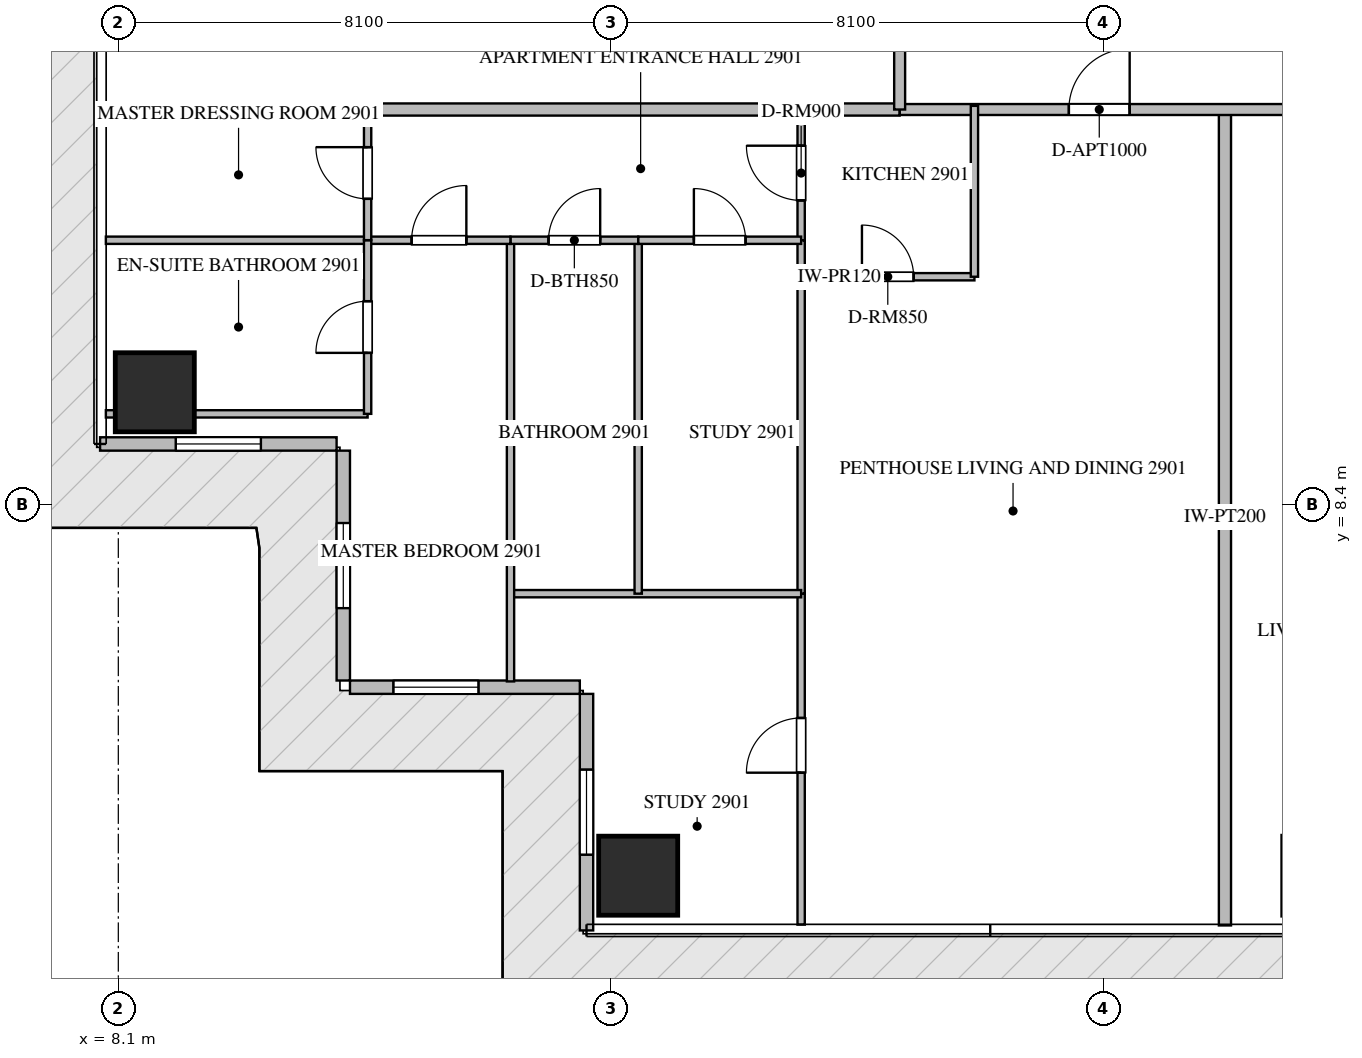
"""IFC4 building model, lengths in metres.
Left out: names, types, materials, properties, quantities, classifications, styles, units other than length and angle.
Written with IfcOpenShell. Run it as: python <this file> out.ifc"""

import sys

from ifc_helpers import new_model, si_unit, direction, frame, frame_2d, origin, origin_2d, place, context, subcontext, project, spatial, rectangle, extrude, source, transform, mapped, element, fill, save


model = new_model("IFC4")
c1 = context("Model", 3, precision=1e-05, world=origin(), true_north=direction((0.0, 1.0)))
c2 = subcontext(c1, "Body", "Model", "MODEL_VIEW")
j1 = project(units=[si_unit("LENGTHUNIT", "METRE"), si_unit("PLANEANGLEUNIT", "RADIAN")], contexts=[c1])
p1 = place(None, origin())
s1 = spatial("IfcSite", under=j1, at=p1, CompositionType="ELEMENT")
p2 = place(p1, origin())
s2 = spatial("IfcBuilding", under=s1, at=p2, CompositionType="ELEMENT")
p3 = place(p2, frame((0.0, 0.0, 120.15)))
s3 = spatial("IfcBuildingStorey", under=s2, at=p3, CompositionType="ELEMENT", Elevation=120.15)
m1 = source(origin(), c2, "Body", "SweptSolid", [
    extrude(rectangle(XDim=1.3, YDim=1.3, at=origin_2d()), origin(), (0.0, 0.0, 1.0), 3.93),
])
for number, where, z_axis, x_axis in (
    (1, (16.65, 2.3, -0.44), (0.0, 0.0, 1.0), (1.0, 0.0, 0.0)),
    (2, (8.7, 10.25, -0.44), (0.0, 0.0, 1.0), (1.0, 0.0, 0.0)),
):
    element("IfcColumn", number, at=place(p3, frame(where, z_axis=z_axis, x_axis=x_axis)), inside=s3, PredefinedType="COLUMN", context=c2, shape_type="MappedRepresentation", body=[
        mapped(m1, transform((0.0, 0.0, 0.0), scale=1.0)),
    ])
p4 = place(p3, frame((7.8, 9.4, 0.0), z_axis=(0.0, 0.0, 1.0), x_axis=(1.0, 0.0, 0.0)))
e3 = element("IfcWall", 3, at=p4, inside=s3, PredefinedType="ELEMENTEDWALL", context=c2, shape_type="SweptSolid", body=[
    extrude(rectangle(XDim=3.89, YDim=0.22, at=frame_2d((1.945, 0.0))), origin(), (0.0, 0.0, 1.0), 3.475),
])
p5 = place(p4, frame((1.245, 0.0, 0.65)))
e4 = element("IfcOpeningElement", 4, at=p5, cuts=e3, PredefinedType="OPENING", context=c2, shape_type="SweptSolid", body=[
    extrude(rectangle(XDim=1.4, YDim=2.05, at=frame_2d((0.7, 1.025))), frame((0.0, 0.12, 0.0), z_axis=(0.0, -1.0, 0.0), x_axis=(1.0, 0.0, 0.0)), (0.0, 0.0, 1.0), 0.24),
])
p6 = place(p3, frame((11.8, 9.29, 0.0), z_axis=(0.0, 0.0, 1.0), x_axis=(0.0, -1.0, 0.0)))
e5 = element("IfcWall", 5, at=p6, inside=s3, PredefinedType="ELEMENTEDWALL", context=c2, shape_type="SweptSolid", body=[
    extrude(rectangle(XDim=3.78, YDim=0.22, at=frame_2d((1.89, 0.0))), origin(), (0.0, 0.0, 1.0), 3.475),
])
p7 = place(p6, frame((1.19, 0.0, 0.65)))
e6 = element("IfcOpeningElement", 6, at=p7, cuts=e5, PredefinedType="OPENING", context=c2, shape_type="SweptSolid", body=[
    extrude(rectangle(XDim=1.4, YDim=2.05, at=frame_2d((0.7, 1.025))), frame((0.0, 0.12, 0.0), z_axis=(0.0, -1.0, 0.0), x_axis=(1.0, 0.0, 0.0)), (0.0, 0.0, 1.0), 0.24),
])
p8 = place(p3, frame((11.91, 5.4, 0.0), z_axis=(0.0, 0.0, 1.0), x_axis=(1.0, 0.0, 0.0)))
e7 = element("IfcWall", 7, at=p8, inside=s3, PredefinedType="ELEMENTEDWALL", context=c2, shape_type="SweptSolid", body=[
    extrude(rectangle(XDim=3.78, YDim=0.22, at=frame_2d((1.89, 0.0))), origin(), (0.0, 0.0, 1.0), 3.475),
])
p9 = place(p8, frame((0.714, 0.0, 0.65)))
e8 = element("IfcOpeningElement", 8, at=p9, cuts=e7, PredefinedType="OPENING", context=c2, shape_type="SweptSolid", body=[
    extrude(rectangle(XDim=1.4, YDim=2.05, at=frame_2d((0.7, 1.025))), frame((0.0, 0.12, 0.0), z_axis=(0.0, -1.0, 0.0), x_axis=(1.0, 0.0, 0.0)), (0.0, 0.0, 1.0), 0.24),
])
p10 = place(p3, frame((15.8, 5.29, 0.0), z_axis=(0.0, 0.0, 1.0), x_axis=(0.0, -1.0, 0.0)))
e9 = element("IfcWall", 9, at=p10, inside=s3, PredefinedType="ELEMENTEDWALL", context=c2, shape_type="SweptSolid", body=[
    extrude(rectangle(XDim=3.89, YDim=0.22, at=frame_2d((1.945, 0.0))), origin(), (0.0, 0.0, 1.0), 3.475),
])
p11 = place(p10, frame((1.245, 0.0, 0.65)))
e10 = element("IfcOpeningElement", 10, at=p11, cuts=e9, PredefinedType="OPENING", context=c2, shape_type="SweptSolid", body=[
    extrude(rectangle(XDim=1.4, YDim=2.05, at=frame_2d((0.7, 1.025))), frame((0.0, 0.12, 0.0), z_axis=(0.0, -1.0, 0.0), x_axis=(1.0, 0.0, 0.0)), (0.0, 0.0, 1.0), 0.24),
])
p12 = place(p3, frame((26.3, 1.482, 0.0), z_axis=(0.0, 0.0, 1.0), x_axis=(0.0, 1.0, 0.0)))
e11 = element("IfcWall", 11, at=p12, inside=s3, PredefinedType="PARTITIONING", context=c2, shape_type="SweptSolid", body=[
    extrude(rectangle(XDim=13.418, YDim=0.2, at=frame_2d((6.709, 0.0))), origin(), (0.0, 0.0, 1.0), 3.49),
])
p13 = place(p3, frame((7.882, 14.9, 0.0), z_axis=(0.0, 0.0, 1.0), x_axis=(1.0, 0.0, 0.0)))
e12 = element("IfcWall", 12, at=p13, inside=s3, PredefinedType="PARTITIONING", context=c2, shape_type="SweptSolid", body=[
    extrude(rectangle(XDim=13.068, YDim=0.2, at=frame_2d((6.534, 0.0))), origin(), (0.0, 0.0, 1.0), 3.49),
])
p14 = place(p3, frame((20.952, 14.9, 0.0), z_axis=(0.0, 0.0, 1.0), x_axis=(1.0, 0.0, 0.0)))
e13 = element("IfcWall", 13, at=p14, inside=s3, PredefinedType="PARTITIONING", context=c2, shape_type="SweptSolid", body=[
    extrude(rectangle(XDim=22.896, YDim=0.18, at=frame_2d((11.448, 0.0))), origin(), (0.0, 0.0, 1.0), 3.49),
])
p15 = place(p14, frame((2.781, 0.0, 0.0)))
e14 = element("IfcOpeningElement", 14, at=p15, cuts=e13, PredefinedType="OPENING", context=c2, shape_type="SweptSolid", body=[
    extrude(rectangle(XDim=1.0, YDim=2.15, at=frame_2d((0.5, 1.075))), frame((0.0, 0.1, 0.0), z_axis=(0.0, -1.0, 0.0), x_axis=(1.0, 0.0, 0.0)), (0.0, 0.0, 1.0), 0.2),
])
p16 = place(p14, frame((7.16, 0.0, 0.0)))
e15 = element("IfcOpeningElement", 15, at=p16, cuts=e13, PredefinedType="OPENING", context=c2, shape_type="SweptSolid", body=[
    extrude(rectangle(XDim=1.0, YDim=2.15, at=frame_2d((0.5, 1.075))), frame((0.0, 0.1, 0.0), z_axis=(0.0, -1.0, 0.0), x_axis=(1.0, 0.0, 0.0)), (0.0, 0.0, 1.0), 0.2),
])
p17 = place(p14, frame((19.115, 0.0, 0.0)))
e16 = element("IfcOpeningElement", 16, at=p17, cuts=e13, PredefinedType="OPENING", context=c2, shape_type="SweptSolid", body=[
    extrude(rectangle(XDim=1.0, YDim=2.15, at=frame_2d((0.5, 1.075))), frame((0.0, 0.1, 0.0), z_axis=(0.0, -1.0, 0.0), x_axis=(1.0, 0.0, 0.0)), (0.0, 0.0, 1.0), 0.2),
])
p18 = place(p3, frame((20.95, 14.9, 0.0), z_axis=(0.0, 0.0, 1.0), x_axis=(0.0, 1.0, 0.0)))
e17 = element("IfcWall", 17, at=p18, inside=s3, PredefinedType="PARTITIONING", context=c2, shape_type="SweptSolid", body=[
    extrude(rectangle(XDim=18.7, YDim=0.18, at=frame_2d((9.35, 0.0))), origin(), (0.0, 0.0, 1.0), 3.49),
])
p19 = place(p18, frame((1.805, 0.0, 0.0)))
e18 = element("IfcOpeningElement", 18, at=p19, cuts=e17, PredefinedType="OPENING", context=c2, shape_type="SweptSolid", body=[
    extrude(rectangle(XDim=1.0, YDim=2.15, at=frame_2d((0.5, 1.075))), frame((0.0, 0.1, 0.0), z_axis=(0.0, -1.0, 0.0), x_axis=(1.0, 0.0, 0.0)), (0.0, 0.0, 1.0), 0.2),
])
p20 = place(p18, frame((10.602, 0.0, 0.0)))
e19 = element("IfcOpeningElement", 19, at=p20, cuts=e17, PredefinedType="OPENING", context=c2, shape_type="SweptSolid", body=[
    extrude(rectangle(XDim=1.0, YDim=2.15, at=frame_2d((0.5, 1.075))), frame((0.0, 0.1, 0.0), z_axis=(0.0, -1.0, 0.0), x_axis=(1.0, 0.0, 0.0)), (0.0, 0.0, 1.0), 0.2),
])
p21 = place(p3, frame((19.33, 12.15, 0.0), z_axis=(0.0, 0.0, 1.0), x_axis=(1.0, 0.0, 0.0)))
e20 = element("IfcWall", 20, at=p21, inside=s3, PredefinedType="PARTITIONING", context=c2, shape_type="SweptSolid", body=[
    extrude(rectangle(XDim=2.85, YDim=0.12, at=frame_2d((1.425, 0.0))), origin(), (0.0, 0.0, 1.0), 3.49),
])
p22 = place(p21, frame((1.0, 0.0, 0.0)))
e21 = element("IfcOpeningElement", 21, at=p22, cuts=e20, PredefinedType="OPENING", context=c2, shape_type="SweptSolid", body=[
    extrude(rectangle(XDim=0.85, YDim=2.1, at=frame_2d((0.425, 1.05))), frame((0.0, 0.07, 0.0), z_axis=(0.0, -1.0, 0.0), x_axis=(1.0, 0.0, 0.0)), (0.0, 0.0, 1.0), 0.14),
])
p23 = place(p3, frame((22.18, 12.15, 0.0), z_axis=(0.0, 0.0, 1.0), x_axis=(0.0, 1.0, 0.0)))
e22 = element("IfcWall", 22, at=p23, inside=s3, PredefinedType="PARTITIONING", context=c2, shape_type="SweptSolid", body=[
    extrude(rectangle(XDim=2.81, YDim=0.12, at=frame_2d((1.405, 0.0))), origin(), (0.0, 0.0, 1.0), 3.49),
])
p24 = place(p3, frame((19.33, 12.75, 0.0), z_axis=(0.0, 0.0, 1.0), x_axis=(0.0, 1.0, 0.0)))
e23 = element("IfcWall", 23, at=p24, inside=s3, PredefinedType="PARTITIONING", context=c2, shape_type="SweptSolid", body=[
    extrude(rectangle(XDim=2.21, YDim=0.12, at=frame_2d((1.105, 0.0))), origin(), (0.0, 0.0, 1.0), 3.49),
])
p25 = place(p24, frame((0.655, 0.0, 0.0)))
e24 = element("IfcOpeningElement", 24, at=p25, cuts=e23, PredefinedType="OPENING", context=c2, shape_type="SweptSolid", body=[
    extrude(rectangle(XDim=0.9, YDim=2.1, at=frame_2d((0.45, 1.05))), frame((0.0, 0.07, 0.0), z_axis=(0.0, -1.0, 0.0), x_axis=(1.0, 0.0, 0.0)), (0.0, 0.0, 1.0), 0.14),
])
p26 = place(p3, frame((19.33, 1.495, 0.0), z_axis=(0.0, 0.0, 1.0), x_axis=(0.0, 1.0, 0.0)))
e25 = element("IfcWall", 25, at=p26, inside=s3, PredefinedType="PARTITIONING", context=c2, shape_type="SweptSolid", body=[
    extrude(rectangle(XDim=5.443, YDim=0.12, at=frame_2d((2.721, 0.0))), origin(), (0.0, 0.0, 1.0), 3.49),
])
p27 = place(p26, frame((2.499, 0.0, 0.0)))
e26 = element("IfcOpeningElement", 26, at=p27, cuts=e25, PredefinedType="OPENING", context=c2, shape_type="SweptSolid", body=[
    extrude(rectangle(XDim=0.9, YDim=2.1, at=frame_2d((0.45, 1.05))), frame((0.0, 0.07, 0.0), z_axis=(0.0, -1.0, 0.0), x_axis=(1.0, 0.0, 0.0)), (0.0, 0.0, 1.0), 0.14),
])
p28 = place(p3, frame((19.33, 6.94, 0.0), z_axis=(0.0, 0.0, 1.0), x_axis=(0.0, 1.0, 0.0)))
e27 = element("IfcWall", 27, at=p28, inside=s3, PredefinedType="PARTITIONING", context=c2, shape_type="SweptSolid", body=[
    extrude(rectangle(XDim=5.808, YDim=0.12, at=frame_2d((2.904, 0.0))), origin(), (0.0, 0.0, 1.0), 3.49),
])
p29 = place(p3, frame((14.55, 6.938, 0.0), z_axis=(0.0, 0.0, 1.0), x_axis=(1.0, 0.0, 0.0)))
e28 = element("IfcWall", 28, at=p29, inside=s3, PredefinedType="PARTITIONING", context=c2, shape_type="SweptSolid", body=[
    extrude(rectangle(XDim=4.78, YDim=0.12, at=frame_2d((2.39, 0.0))), origin(), (0.0, 0.0, 1.0), 3.49),
])
p30 = place(p3, frame((14.55, 5.495, 0.0), z_axis=(0.0, 0.0, 1.0), x_axis=(0.0, 1.0, 0.0)))
e29 = element("IfcWall", 29, at=p30, inside=s3, PredefinedType="PARTITIONING", context=c2, shape_type="SweptSolid", body=[
    extrude(rectangle(XDim=7.255, YDim=0.12, at=frame_2d((3.627, 0.0))), origin(), (0.0, 0.0, 1.0), 3.49),
])
p31 = place(p3, frame((16.65, 6.938, 0.0), z_axis=(0.0, 0.0, 1.0), x_axis=(0.0, 1.0, 0.0)))
e30 = element("IfcWall", 30, at=p31, inside=s3, PredefinedType="PARTITIONING", context=c2, shape_type="SweptSolid", body=[
    extrude(rectangle(XDim=5.812, YDim=0.12, at=frame_2d((2.906, 0.0))), origin(), (0.0, 0.0, 1.0), 2.972),
])
p32 = place(p3, frame((14.55, 12.75, 0.0), z_axis=(0.0, 0.0, 1.0), x_axis=(1.0, 0.0, 0.0)))
e31 = element("IfcWall", 31, at=p32, inside=s3, PredefinedType="PARTITIONING", context=c2, shape_type="SweptSolid", body=[
    extrude(rectangle(XDim=2.1, YDim=0.12, at=frame_2d((1.05, 0.0))), origin(), (0.0, 0.0, 1.0), 3.49),
])
p33 = place(p32, frame((0.625, 0.0, 0.0)))
e32 = element("IfcOpeningElement", 32, at=p33, cuts=e31, PredefinedType="OPENING", context=c2, shape_type="SweptSolid", body=[
    extrude(rectangle(XDim=0.85, YDim=2.1, at=frame_2d((0.425, 1.05))), frame((0.0, 0.07, 0.0), z_axis=(0.0, -1.0, 0.0), x_axis=(1.0, 0.0, 0.0)), (0.0, 0.0, 1.0), 0.14),
])
p34 = place(p3, frame((16.652, 12.75, 0.0), z_axis=(0.0, 0.0, 1.0), x_axis=(1.0, 0.0, 0.0)))
e33 = element("IfcWall", 33, at=p34, inside=s3, PredefinedType="PARTITIONING", context=c2, shape_type="SweptSolid", body=[
    extrude(rectangle(XDim=2.678, YDim=0.12, at=frame_2d((1.339, 0.0))), origin(), (0.0, 0.0, 1.0), 3.49),
])
p35 = place(p34, frame((0.914, 0.0, 0.0)))
e34 = element("IfcOpeningElement", 34, at=p35, cuts=e33, PredefinedType="OPENING", context=c2, shape_type="SweptSolid", body=[
    extrude(rectangle(XDim=0.85, YDim=2.1, at=frame_2d((0.425, 1.05))), frame((0.0, 0.07, 0.0), z_axis=(0.0, -1.0, 0.0), x_axis=(1.0, 0.0, 0.0)), (0.0, 0.0, 1.0), 0.14),
])
p36 = place(p3, frame((12.2, 12.75, 0.0), z_axis=(0.0, 0.0, 1.0), x_axis=(1.0, 0.0, 0.0)))
e35 = element("IfcWall", 35, at=p36, inside=s3, PredefinedType="PARTITIONING", context=c2, shape_type="SweptSolid", body=[
    extrude(rectangle(XDim=2.348, YDim=0.12, at=frame_2d((1.174, 0.0))), origin(), (0.0, 0.0, 1.0), 3.49),
])
p37 = place(p36, frame((0.724, 0.0, 0.0)))
e36 = element("IfcOpeningElement", 36, at=p37, cuts=e35, PredefinedType="OPENING", context=c2, shape_type="SweptSolid", body=[
    extrude(rectangle(XDim=0.9, YDim=2.1, at=frame_2d((0.45, 1.05))), frame((0.0, 0.07, 0.0), z_axis=(0.0, -1.0, 0.0), x_axis=(1.0, 0.0, 0.0)), (0.0, 0.0, 1.0), 0.14),
])
p38 = place(p3, frame((7.895, 9.895, 0.0), z_axis=(0.0, 0.0, 1.0), x_axis=(1.0, 0.0, 0.0)))
e37 = element("IfcWall", 37, at=p38, inside=s3, PredefinedType="PARTITIONING", context=c2, shape_type="SweptSolid", body=[
    extrude(rectangle(XDim=4.305, YDim=0.12, at=frame_2d((2.152, 0.0))), origin(), (0.0, 0.0, 1.0), 3.49),
])
p39 = place(p3, frame((7.895, 12.75, 0.0), z_axis=(0.0, 0.0, 1.0), x_axis=(1.0, 0.0, 0.0)))
e38 = element("IfcWall", 38, at=p39, inside=s3, PredefinedType="PARTITIONING", context=c2, shape_type="SweptSolid", body=[
    extrude(rectangle(XDim=4.303, YDim=0.12, at=frame_2d((2.151, 0.0))), origin(), (0.0, 0.0, 1.0), 3.49),
])
p40 = place(p3, frame((12.2, 9.895, 0.0), z_axis=(0.0, 0.0, 1.0), x_axis=(0.0, 1.0, 0.0)))
e39 = element("IfcWall", 39, at=p40, inside=s3, PredefinedType="PARTITIONING", context=c2, shape_type="SweptSolid", body=[
    extrude(rectangle(XDim=2.855, YDim=0.12, at=frame_2d((1.427, 0.0))), origin(), (0.0, 0.0, 1.0), 3.49),
])
p41 = place(p40, frame((1.003, 0.0, 0.0)))
e40 = element("IfcOpeningElement", 40, at=p41, cuts=e39, PredefinedType="OPENING", context=c2, shape_type="SweptSolid", body=[
    extrude(rectangle(XDim=0.85, YDim=2.1, at=frame_2d((0.425, 1.05))), frame((0.0, 0.07, 0.0), z_axis=(0.0, -1.0, 0.0), x_axis=(1.0, 0.0, 0.0)), (0.0, 0.0, 1.0), 0.14),
])
p42 = place(p3, frame((12.2, 12.752, 0.0), z_axis=(0.0, 0.0, 1.0), x_axis=(0.0, 1.0, 0.0)))
e41 = element("IfcWall", 41, at=p42, inside=s3, PredefinedType="PARTITIONING", context=c2, shape_type="SweptSolid", body=[
    extrude(rectangle(XDim=2.208, YDim=0.12, at=frame_2d((1.104, 0.0))), origin(), (0.0, 0.0, 1.0), 3.49),
])
p43 = place(p42, frame((0.679, 0.0, 0.0)))
e42 = element("IfcOpeningElement", 42, at=p43, cuts=e41, PredefinedType="OPENING", context=c2, shape_type="SweptSolid", body=[
    extrude(rectangle(XDim=0.85, YDim=2.1, at=frame_2d((0.425, 1.05))), frame((0.0, 0.07, 0.0), z_axis=(0.0, -1.0, 0.0), x_axis=(1.0, 0.0, 0.0)), (0.0, 0.0, 1.0), 0.14),
])
m2 = source(origin(), c2, "Body", "SweptSolid", [
    extrude(rectangle(XDim=1.4, YDim=2.05, at=frame_2d((0.7, 1.025))), frame((0.0, 0.03, 0.0), z_axis=(0.0, -1.0, 0.0), x_axis=(1.0, 0.0, 0.0)), (0.0, 0.0, 1.0), 0.06),
])
p44 = place(p5, origin())
e43 = element("IfcWindow", 43, at=p44, inside=s3, PartitioningType="SINGLE_PANEL", PredefinedType="WINDOW", context=c2, shape_type="MappedRepresentation", body=[
    mapped(m2, transform((0.0, 0.0, 0.0), scale=1.0)),
])
fill(e4, e43)
p45 = place(p7, origin())
e44 = element("IfcWindow", 44, at=p45, inside=s3, PartitioningType="SINGLE_PANEL", PredefinedType="WINDOW", context=c2, shape_type="MappedRepresentation", body=[
    mapped(m2, transform((0.0, 0.0, 0.0), scale=1.0)),
])
fill(e6, e44)
p46 = place(p9, origin())
e45 = element("IfcWindow", 45, at=p46, inside=s3, PartitioningType="SINGLE_PANEL", PredefinedType="WINDOW", context=c2, shape_type="MappedRepresentation", body=[
    mapped(m2, transform((0.0, 0.0, 0.0), scale=1.0)),
])
fill(e8, e45)
p47 = place(p11, origin())
e46 = element("IfcWindow", 46, at=p47, inside=s3, PartitioningType="SINGLE_PANEL", PredefinedType="WINDOW", context=c2, shape_type="MappedRepresentation", body=[
    mapped(m2, transform((0.0, 0.0, 0.0), scale=1.0)),
])
fill(e10, e46)
m3 = source(origin(), c2, "Body", "SweptSolid", [
    extrude(rectangle(XDim=1.0, YDim=2.15, at=frame_2d((0.5, 1.075))), frame((0.0, 0.025, 0.0), z_axis=(0.0, -1.0, 0.0), x_axis=(1.0, 0.0, 0.0)), (0.0, 0.0, 1.0), 0.05),
])
p48 = place(p15, origin())
e47 = element("IfcDoor", 47, at=p48, inside=s3, OperationType="SINGLE_SWING_RIGHT", PredefinedType="DOOR", context=c2, shape_type="MappedRepresentation", body=[
    mapped(m3, transform((0.0, 0.0, 0.0), scale=1.0)),
])
fill(e14, e47)
m4 = source(origin(), c2, "Body", "SweptSolid", [
    extrude(rectangle(XDim=0.85, YDim=2.1, at=frame_2d((0.425, 1.05))), frame((0.0, 0.025, 0.0), z_axis=(0.0, -1.0, 0.0), x_axis=(1.0, 0.0, 0.0)), (0.0, 0.0, 1.0), 0.05),
])
p49 = place(p22, origin())
e48 = element("IfcDoor", 48, at=p49, inside=s3, OperationType="SINGLE_SWING_LEFT", PredefinedType="DOOR", context=c2, shape_type="MappedRepresentation", body=[
    mapped(m4, transform((0.0, 0.0, 0.0), scale=1.0)),
])
fill(e21, e48)
m5 = source(origin(), c2, "Body", "SweptSolid", [
    extrude(rectangle(XDim=0.9, YDim=2.1, at=frame_2d((0.45, 1.05))), frame((0.0, 0.025, 0.0), z_axis=(0.0, -1.0, 0.0), x_axis=(1.0, 0.0, 0.0)), (0.0, 0.0, 1.0), 0.05),
])
p50 = place(p25, origin())
e49 = element("IfcDoor", 49, at=p50, inside=s3, OperationType="SINGLE_SWING_RIGHT", PredefinedType="DOOR", context=c2, shape_type="MappedRepresentation", body=[
    mapped(m5, transform((0.0, 0.0, 0.0), scale=1.0)),
])
fill(e24, e49)
p51 = place(p27, origin())
e50 = element("IfcDoor", 50, at=p51, inside=s3, OperationType="SINGLE_SWING_LEFT", PredefinedType="DOOR", context=c2, shape_type="MappedRepresentation", body=[
    mapped(m5, transform((0.0, 0.0, 0.0), scale=1.0)),
])
fill(e26, e50)
p52 = place(p33, origin())
e51 = element("IfcDoor", 51, at=p52, inside=s3, OperationType="SINGLE_SWING_RIGHT", PredefinedType="DOOR", context=c2, shape_type="MappedRepresentation", body=[
    mapped(m4, transform((0.0, 0.0, 0.0), scale=1.0)),
])
fill(e32, e51)
p53 = place(p35, origin())
e52 = element("IfcDoor", 52, at=p53, inside=s3, OperationType="SINGLE_SWING_LEFT", PredefinedType="DOOR", context=c2, shape_type="MappedRepresentation", body=[
    mapped(m4, transform((0.0, 0.0, 0.0), scale=1.0)),
])
fill(e34, e52)
p54 = place(p37, origin())
e53 = element("IfcDoor", 53, at=p54, inside=s3, OperationType="SINGLE_SWING_RIGHT", PredefinedType="DOOR", context=c2, shape_type="MappedRepresentation", body=[
    mapped(m5, transform((0.0, 0.0, 0.0), scale=1.0)),
])
fill(e36, e53)
p55 = place(p41, origin())
e54 = element("IfcDoor", 54, at=p55, inside=s3, OperationType="SINGLE_SWING_LEFT", PredefinedType="DOOR", context=c2, shape_type="MappedRepresentation", body=[
    mapped(m4, transform((0.0, 0.0, 0.0), scale=1.0)),
])
fill(e40, e54)
p56 = place(p43, origin())
e55 = element("IfcDoor", 55, at=p56, inside=s3, OperationType="SINGLE_SWING_RIGHT", PredefinedType="DOOR", context=c2, shape_type="MappedRepresentation", body=[
    mapped(m4, transform((0.0, 0.0, 0.0), scale=1.0)),
])
fill(e42, e55)
save(model, sys.argv[1])
